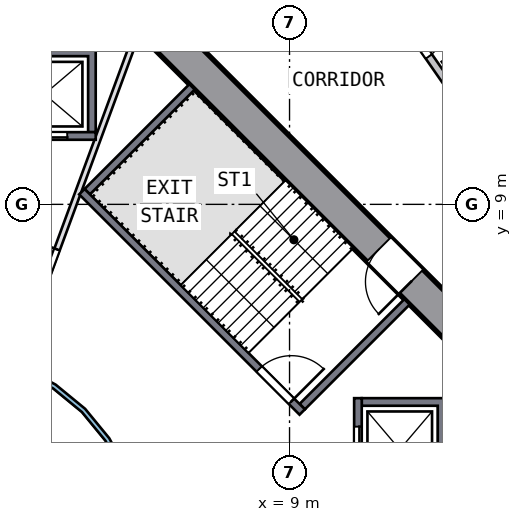
"""IFC4 building model, lengths in metres.
Left out: names, types, materials, properties, quantities, classifications, styles, units other than length and angle.
Written with IfcOpenShell. Run it as: python <this file> out.ifc"""

import sys

from ifc_helpers import new_model, si_unit, direction, frame, frame_2d, origin, place, context, subcontext, project, spatial, polyline, rectangle, outline, extrude, element, fill, save


model = new_model("IFC4")
c1 = context("Model", 3, precision=1e-05, world=origin(), true_north=direction((0.0, 1.0)))
c2 = subcontext(c1, "Body", "Model", "MODEL_VIEW")
j1 = project(units=[si_unit("LENGTHUNIT", "METRE"), si_unit("PLANEANGLEUNIT", "RADIAN")], contexts=[c1])
p1 = place(None, origin())
s1 = spatial("IfcSite", under=j1, at=p1, CompositionType="ELEMENT")
p2 = place(p1, origin())
s2 = spatial("IfcBuilding", under=s1, at=p2, CompositionType="ELEMENT")
p3 = place(p2, frame((0.0, 0.0, 53.0)))
s3 = spatial("IfcBuildingStorey", under=s2, at=p3, CompositionType="ELEMENT", Elevation=53.0)
p4 = place(p3, frame((13.682, 5.481, 0.0), z_axis=(0.0, 0.0, 1.0), x_axis=(-0.707106781, 0.707106781, 0.0)))
e1 = element("IfcWall", 1, at=p4, inside=s3, PredefinedType="SHEAR", context=c2, shape_type="SweptSolid", body=[
    extrude(rectangle(XDim=11.598, YDim=0.9, at=frame_2d((5.799, 0.0))), origin(), (0.0, 0.0, 1.0), 3.5),
])
p5 = place(p4, frame((2.099, 0.0, 0.0)))
e2 = element("IfcOpeningElement", 2, at=p5, cuts=e1, PredefinedType="OPENING", context=c2, shape_type="SweptSolid", body=[
    extrude(rectangle(XDim=1.2, YDim=2.1, at=frame_2d((0.6, 1.05))), frame((0.0, 0.46, 0.0), z_axis=(0.0, -1.0, 0.0), x_axis=(1.0, 0.0, 0.0)), (0.0, 0.0, 1.0), 0.92),
])
p6 = place(p3, origin())
e3 = element("IfcWall", 3, at=p6, inside=s3, PredefinedType="SOLIDWALL", context=c2, shape_type="SweptSolid", body=[
    extrude(outline(polyline([(13.1, 3.9), (13.1, 1.2), (10.9, 1.2), (10.9, 1.4), (12.9, 1.4), (12.9, 3.7), (10.9, 3.7), (10.9, 3.9), (13.1, 3.9)])), origin(), (0.0, 0.0, 1.0), 3.19),
])
p7 = place(p3, frame((10.8, 1.2, 0.0), z_axis=(0.0, 0.0, 1.0), x_axis=(0.0, 1.0, 0.0)))
e4 = element("IfcWall", 4, at=p7, inside=s3, PredefinedType="SOLIDWALL", context=c2, shape_type="SweptSolid", body=[
    extrude(rectangle(XDim=2.7, YDim=0.2, at=frame_2d((1.35, 0.0))), origin(), (0.0, 0.0, 1.0), 3.19),
])
p8 = place(p7, frame((0.75, 0.0, 0.0)))
e5 = element("IfcOpeningElement", 5, at=p8, cuts=e4, PredefinedType="OPENING", context=c2, shape_type="SweptSolid", body=[
    extrude(rectangle(XDim=1.2, YDim=2.1, at=frame_2d((0.6, 1.05))), frame((0.0, 0.11, 0.0), z_axis=(0.0, -1.0, 0.0), x_axis=(1.0, 0.0, 0.0)), (0.0, 0.0, 1.0), 0.22),
])
p9 = place(p3, origin())
e6 = element("IfcWall", 6, at=p9, inside=s3, PredefinedType="SOLIDWALL", context=c2, shape_type="SweptSolid", body=[
    extrude(outline(polyline([(3.9, 13.1), (3.9, 10.9), (3.7, 10.9), (3.7, 12.9), (1.4, 12.9), (1.4, 10.9), (1.2, 10.9), (1.2, 13.1), (3.9, 13.1)])), origin(), (0.0, 0.0, 1.0), 3.19),
])
p10 = place(p3, frame((1.2, 10.8, 0.0), z_axis=(0.0, 0.0, 1.0), x_axis=(1.0, 0.0, 0.0)))
e7 = element("IfcWall", 7, at=p10, inside=s3, PredefinedType="SOLIDWALL", context=c2, shape_type="SweptSolid", body=[
    extrude(rectangle(XDim=2.7, YDim=0.2, at=frame_2d((1.35, 0.0))), origin(), (0.0, 0.0, 1.0), 3.19),
])
p11 = place(p10, frame((0.75, 0.0, 0.0)))
e8 = element("IfcOpeningElement", 8, at=p11, cuts=e7, PredefinedType="OPENING", context=c2, shape_type="SweptSolid", body=[
    extrude(rectangle(XDim=1.2, YDim=2.1, at=frame_2d((0.6, 1.05))), frame((0.0, 0.11, 0.0), z_axis=(0.0, -1.0, 0.0), x_axis=(1.0, 0.0, 0.0)), (0.0, 0.0, 1.0), 0.22),
])
p12 = place(p3, frame((3.535, 9.334, 0.0), z_axis=(0.0, 0.0, 1.0), x_axis=(0.707106781, -0.707106781, 0.0)))
e9 = element("IfcWall", 9, at=p12, inside=s3, PredefinedType="SOLIDWALL", context=c2, shape_type="SweptSolid", body=[
    extrude(rectangle(XDim=8.2, YDim=0.2, at=frame_2d((4.1, 0.0))), origin(), (0.0, 0.0, 1.0), 3.19),
])
p13 = place(p12, frame((6.6, 0.0, 0.0)))
e10 = element("IfcOpeningElement", 10, at=p13, cuts=e9, PredefinedType="OPENING", context=c2, shape_type="SweptSolid", body=[
    extrude(rectangle(XDim=1.2, YDim=2.1, at=frame_2d((0.6, 1.05))), frame((0.0, 0.11, 0.0), z_axis=(0.0, -1.0, 0.0), x_axis=(1.0, 0.0, 0.0)), (0.0, 0.0, 1.0), 0.22),
])
for number, where, z_axis, x_axis in (
    (11, (9.334, 3.677, 0.0), (0.0, 0.0, 1.0), (0.707, 0.707, 0.0)),
    (12, (3.677, 9.334, 0.0), (0.0, 0.0, 1.0), (0.707, 0.707, 0.0)),
):
    element("IfcWall", number, at=place(p3, frame(where, z_axis=z_axis, x_axis=x_axis)), inside=s3, PredefinedType="SOLIDWALL", context=c2, shape_type="SweptSolid", body=[
        extrude(rectangle(XDim=3.9, YDim=0.2, at=frame_2d((1.95, 0.0))), origin(), (0.0, 0.0, 1.0), 3.19),
    ])
p14 = place(p3, frame((1.776, 4.813, 0.0), z_axis=(0.0, 0.0, 1.0), x_axis=(0.346112737, 0.93819293, 0.0)))
e13 = element("IfcWall", 13, at=p14, inside=s3, PredefinedType="PARTITIONING", context=c2, shape_type="SweptSolid", body=[
    extrude(rectangle(XDim=8.803, YDim=0.15, at=frame_2d((4.402, 0.0))), origin(), (0.0, 0.0, 1.0), 3.19),
])
p15 = place(p14, frame((1.4, 0.0, 0.0)))
e14 = element("IfcOpeningElement", 14, at=p15, cuts=e13, PredefinedType="OPENING", context=c2, shape_type="SweptSolid", body=[
    extrude(rectangle(XDim=1.8, YDim=2.1, at=frame_2d((0.9, 1.05))), frame((0.0, 0.085, 0.0), z_axis=(0.0, -1.0, 0.0), x_axis=(1.0, 0.0, 0.0)), (0.0, 0.0, 1.0), 0.17),
])
p16 = place(p3, origin())
e15 = element("IfcWall", 15, at=p16, inside=s3, PredefinedType="SOLIDWALL", context=c2, shape_type="SweptSolid", body=[
    extrude(outline(polyline([(5.021, -0.999), (4.73, -1.959), (4.257, -2.844), (3.62, -3.62), (2.844, -4.257), (1.959, -4.73), (0.999, -5.021), (0.0, -5.12), (-0.999, -5.021), (-1.959, -4.73), (-2.844, -4.257), (-3.62, -3.62), (-4.257, -2.844), (-4.73, -1.959), (-5.021, -0.999), (-5.12, 0.0), (-5.021, 0.999), (-4.73, 1.959), (-4.257, 2.844), (-3.62, 3.62), (-2.844, 4.257), (-1.959, 4.73), (-0.999, 5.021), (0.0, 5.12), (0.999, 5.021), (1.959, 4.73), (2.844, 4.257), (3.62, 3.62), (4.257, 2.844), (4.73, 1.959), (5.021, 0.999), (5.12, 0.0), (5.021, -0.999)]), holes=[polyline([(4.904, 0.976), (4.619, 1.913), (4.157, 2.778), (3.535, 3.535), (2.778, 4.157), (1.913, 4.619), (0.976, 4.904), (0.0, 5.0), (-0.976, 4.904), (-1.913, 4.619), (-2.778, 4.157), (-3.535, 3.535), (-4.157, 2.778), (-4.619, 1.913), (-4.904, 0.976), (-5.0, 0.0), (-4.904, -0.976), (-4.619, -1.913), (-4.157, -2.778), (-3.535, -3.535), (-2.778, -4.157), (-1.913, -4.619), (-0.976, -4.904), (0.0, -5.0), (0.976, -4.904), (1.913, -4.619), (2.778, -4.157), (3.535, -3.535), (4.157, -2.778), (4.619, -1.913), (4.904, -0.976), (5.0, 0.0), (4.904, 0.976)])]), origin(), (0.0, 0.0, 1.0), 3.19),
])
p17 = place(p3, frame((11.981, 13.877, 0.0), z_axis=(0.0, 0.0, 1.0), x_axis=(0.570714468, -0.821148583, 0.0)))
e16 = element("IfcWall", 16, at=p17, inside=s3, PredefinedType="SOLIDWALL", context=c2, shape_type="SweptSolid", body=[
    extrude(rectangle(XDim=9.116, YDim=0.2, at=frame_2d((4.558, 0.0))), origin(), (0.0, 0.0, 1.0), 3.19),
])
p18 = place(p17, frame((0.2, 0.0, 0.0)))
e17 = element("IfcOpeningElement", 17, at=p18, cuts=e16, PredefinedType="OPENING", context=c2, shape_type="SweptSolid", body=[
    extrude(rectangle(XDim=1.0, YDim=2.1, at=frame_2d((0.5, 1.05))), frame((0.0, 0.11, 0.0), z_axis=(0.0, -1.0, 0.0), x_axis=(1.0, 0.0, 0.0)), (0.0, 0.0, 1.0), 0.22),
])
p19 = place(p3, frame((15.662, 14.539, 0.0), z_axis=(0.0, 0.0, 1.0), x_axis=(-0.821155462, -0.570704572, 0.0)))
e18 = element("IfcWall", 18, at=p19, inside=s3, PredefinedType="PARTITIONING", context=c2, shape_type="SweptSolid", body=[
    extrude(rectangle(XDim=3.2, YDim=0.1, at=frame_2d((1.6, 0.0))), origin(), (0.0, 0.0, 1.0), 3.19),
])
p20 = place(p19, frame((1.25, 0.0, 0.0)))
e19 = element("IfcOpeningElement", 19, at=p20, cuts=e18, PredefinedType="OPENING", context=c2, shape_type="SweptSolid", body=[
    extrude(rectangle(XDim=0.9, YDim=2.1, at=frame_2d((0.45, 1.05))), frame((0.0, 0.06, 0.0), z_axis=(0.0, -1.0, 0.0), x_axis=(1.0, 0.0, 0.0)), (0.0, 0.0, 1.0), 0.12),
])
p21 = place(p8, origin())
e20 = element("IfcDoor", 20, at=p21, inside=s3, OperationType="DOUBLE_DOOR_SLIDING", PredefinedType="DOOR", context=c2, shape_type="SweptSolid", body=[
    extrude(rectangle(XDim=1.2, YDim=2.1, at=frame_2d((0.6, 1.05))), frame((0.0, 0.025, 0.0), z_axis=(0.0, -1.0, 0.0), x_axis=(1.0, 0.0, 0.0)), (0.0, 0.0, 1.0), 0.05),
])
fill(e5, e20)
p22 = place(p11, origin())
e21 = element("IfcDoor", 21, at=p22, inside=s3, OperationType="DOUBLE_DOOR_SLIDING", PredefinedType="DOOR", context=c2, shape_type="SweptSolid", body=[
    extrude(rectangle(XDim=1.2, YDim=2.1, at=frame_2d((0.6, 1.05))), frame((0.0, 0.025, 0.0), z_axis=(0.0, -1.0, 0.0), x_axis=(1.0, 0.0, 0.0)), (0.0, 0.0, 1.0), 0.05),
])
fill(e8, e21)
p23 = place(p13, origin())
e22 = element("IfcDoor", 22, at=p23, inside=s3, OperationType="SINGLE_SWING_RIGHT", PredefinedType="DOOR", context=c2, shape_type="SweptSolid", body=[
    extrude(rectangle(XDim=1.2, YDim=2.1, at=frame_2d((0.6, 1.05))), frame((0.0, 0.025, 0.0), z_axis=(0.0, -1.0, 0.0), x_axis=(1.0, 0.0, 0.0)), (0.0, 0.0, 1.0), 0.05),
])
fill(e10, e22)
p24 = place(p5, origin())
e23 = element("IfcDoor", 23, at=p24, inside=s3, OperationType="SINGLE_SWING_LEFT", PredefinedType="DOOR", context=c2, shape_type="SweptSolid", body=[
    extrude(rectangle(XDim=1.2, YDim=2.1, at=frame_2d((0.6, 1.05))), frame((0.0, 0.025, 0.0), z_axis=(0.0, -1.0, 0.0), x_axis=(1.0, 0.0, 0.0)), (0.0, 0.0, 1.0), 0.05),
])
fill(e2, e23)
p25 = place(p15, origin())
e24 = element("IfcDoor", 24, at=p25, inside=s3, OperationType="DOUBLE_DOOR_SINGLE_SWING", PredefinedType="DOOR", context=c2, shape_type="SweptSolid", body=[
    extrude(rectangle(XDim=1.8, YDim=2.1, at=frame_2d((0.9, 1.05))), frame((0.0, 0.025, 0.0), z_axis=(0.0, -1.0, 0.0), x_axis=(1.0, 0.0, 0.0)), (0.0, 0.0, 1.0), 0.05),
])
fill(e14, e24)
p26 = place(p18, origin())
e25 = element("IfcDoor", 25, at=p26, inside=s3, OperationType="SINGLE_SWING_LEFT", PredefinedType="DOOR", context=c2, shape_type="SweptSolid", body=[
    extrude(rectangle(XDim=1.0, YDim=2.1, at=frame_2d((0.5, 1.05))), frame((0.0, 0.025, 0.0), z_axis=(0.0, -1.0, 0.0), x_axis=(1.0, 0.0, 0.0)), (0.0, 0.0, 1.0), 0.05),
])
fill(e17, e25)
save(model, sys.argv[1])
